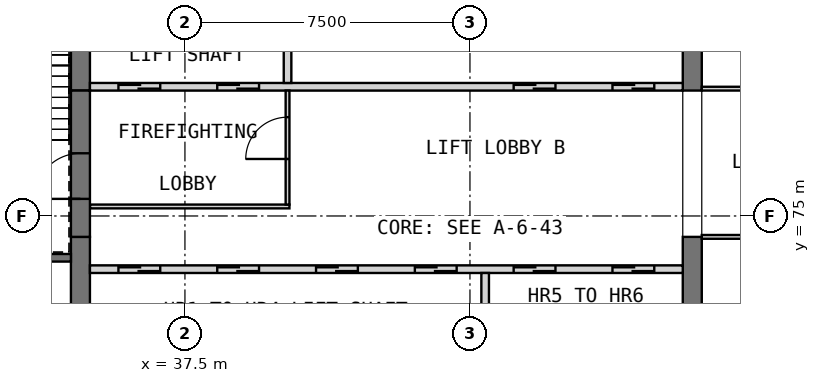
"""IFC4 building model, lengths in metres.
Left out: names, types, materials, properties, quantities, classifications, styles, units other than length and angle.
Written with IfcOpenShell. Run it as: python <this file> out.ifc"""

import sys

from ifc_helpers import new_model, si_unit, direction, frame, frame_2d, origin, place, context, subcontext, project, spatial, rectangle, extrude, element, fill, save


model = new_model("IFC4")
c1 = context("Model", 3, precision=1e-05, world=origin(), true_north=direction((0.0, 1.0)))
c2 = subcontext(c1, "Body", "Model", "MODEL_VIEW")
j1 = project(units=[si_unit("LENGTHUNIT", "METRE"), si_unit("PLANEANGLEUNIT", "RADIAN")], contexts=[c1])
p1 = place(None, origin())
s1 = spatial("IfcSite", under=j1, at=p1, CompositionType="ELEMENT")
p2 = place(p1, origin())
s2 = spatial("IfcBuilding", under=s1, at=p2, CompositionType="ELEMENT")
p3 = place(p2, frame((0.0, 0.0, 292.2)))
s3 = spatial("IfcBuildingStorey", under=s2, at=p3, CompositionType="ELEMENT", Elevation=292.2)
p4 = place(p3, frame((34.75, 68.05, 0.0), z_axis=(0.0, 0.0, 1.0), x_axis=(0.0, 1.0, 0.0)))
e1 = element("IfcWall", 1, at=p4, inside=s3, PredefinedType="SHEAR", context=c2, shape_type="SweptSolid", body=[
    extrude(rectangle(XDim=6.4, YDim=0.5, at=frame_2d((3.2, 0.0))), origin(), (0.0, 0.0, 1.0), 5.5),
])
p5 = place(p3, frame((34.75, 78.3, 0.0), z_axis=(0.0, 0.0, 1.0), x_axis=(0.0, 1.0, 0.0)))
e2 = element("IfcWall", 2, at=p5, inside=s3, PredefinedType="SHEAR", context=c2, shape_type="SweptSolid", body=[
    extrude(rectangle(XDim=3.6, YDim=0.5, at=frame_2d((1.8, 0.0))), origin(), (0.0, 0.0, 1.0), 5.5),
])
p6 = place(p3, frame((50.85, 68.05, 0.0), z_axis=(0.0, 0.0, 1.0), x_axis=(0.0, 1.0, 0.0)))
e3 = element("IfcWall", 3, at=p6, inside=s3, PredefinedType="SHEAR", context=c2, shape_type="SweptSolid", body=[
    extrude(rectangle(XDim=6.4, YDim=0.5, at=frame_2d((3.2, 0.0))), origin(), (0.0, 0.0, 1.0), 5.5),
])
p7 = place(p3, frame((50.85, 78.3, 0.0), z_axis=(0.0, 0.0, 1.0), x_axis=(0.0, 1.0, 0.0)))
e4 = element("IfcWall", 4, at=p7, inside=s3, PredefinedType="SHEAR", context=c2, shape_type="SweptSolid", body=[
    extrude(rectangle(XDim=3.6, YDim=0.5, at=frame_2d((1.8, 0.0))), origin(), (0.0, 0.0, 1.0), 5.5),
])
p8 = place(p3, frame((35.0, 73.6, 0.0), z_axis=(0.0, 0.0, 1.0), x_axis=(1.0, 0.0, 0.0)))
e5 = element("IfcWall", 5, at=p8, inside=s3, PredefinedType="SOLIDWALL", context=c2, shape_type="SweptSolid", body=[
    extrude(rectangle(XDim=15.6, YDim=0.2, at=frame_2d((7.8, 0.0))), origin(), (0.0, 0.0, 1.0), 5.5),
])
p9 = place(p8, frame((0.75, 0.0, 0.0)))
e6 = element("IfcOpeningElement", 6, at=p9, cuts=e5, PredefinedType="OPENING", context=c2, shape_type="SweptSolid", body=[
    extrude(rectangle(XDim=1.1, YDim=2.1, at=frame_2d((0.55, 1.05))), frame((0.0, 0.11, 0.0), z_axis=(0.0, -1.0, 0.0), x_axis=(1.0, 0.0, 0.0)), (0.0, 0.0, 1.0), 0.22),
])
p10 = place(p8, frame((3.35, 0.0, 0.0)))
e7 = element("IfcOpeningElement", 7, at=p10, cuts=e5, PredefinedType="OPENING", context=c2, shape_type="SweptSolid", body=[
    extrude(rectangle(XDim=1.1, YDim=2.1, at=frame_2d((0.55, 1.05))), frame((0.0, 0.11, 0.0), z_axis=(0.0, -1.0, 0.0), x_axis=(1.0, 0.0, 0.0)), (0.0, 0.0, 1.0), 0.22),
])
p11 = place(p8, frame((5.95, 0.0, 0.0)))
e8 = element("IfcOpeningElement", 8, at=p11, cuts=e5, PredefinedType="OPENING", context=c2, shape_type="SweptSolid", body=[
    extrude(rectangle(XDim=1.1, YDim=2.1, at=frame_2d((0.55, 1.05))), frame((0.0, 0.11, 0.0), z_axis=(0.0, -1.0, 0.0), x_axis=(1.0, 0.0, 0.0)), (0.0, 0.0, 1.0), 0.22),
])
p12 = place(p8, frame((8.55, 0.0, 0.0)))
e9 = element("IfcOpeningElement", 9, at=p12, cuts=e5, PredefinedType="OPENING", context=c2, shape_type="SweptSolid", body=[
    extrude(rectangle(XDim=1.1, YDim=2.1, at=frame_2d((0.55, 1.05))), frame((0.0, 0.11, 0.0), z_axis=(0.0, -1.0, 0.0), x_axis=(1.0, 0.0, 0.0)), (0.0, 0.0, 1.0), 0.22),
])
p13 = place(p8, frame((11.15, 0.0, 0.0)))
e10 = element("IfcOpeningElement", 10, at=p13, cuts=e5, PredefinedType="OPENING", context=c2, shape_type="SweptSolid", body=[
    extrude(rectangle(XDim=1.1, YDim=2.1, at=frame_2d((0.55, 1.05))), frame((0.0, 0.11, 0.0), z_axis=(0.0, -1.0, 0.0), x_axis=(1.0, 0.0, 0.0)), (0.0, 0.0, 1.0), 0.22),
])
p14 = place(p8, frame((13.75, 0.0, 0.0)))
e11 = element("IfcOpeningElement", 11, at=p14, cuts=e5, PredefinedType="OPENING", context=c2, shape_type="SweptSolid", body=[
    extrude(rectangle(XDim=1.1, YDim=2.1, at=frame_2d((0.55, 1.05))), frame((0.0, 0.11, 0.0), z_axis=(0.0, -1.0, 0.0), x_axis=(1.0, 0.0, 0.0)), (0.0, 0.0, 1.0), 0.22),
])
p15 = place(p3, frame((45.4, 71.5, 0.0), z_axis=(0.0, 0.0, 1.0), x_axis=(0.0, 1.0, 0.0)))
e12 = element("IfcWall", 12, at=p15, inside=s3, PredefinedType="SOLIDWALL", context=c2, shape_type="SweptSolid", body=[
    extrude(rectangle(XDim=2.0, YDim=0.2, at=frame_2d((1.0, 0.0))), origin(), (0.0, 0.0, 1.0), 5.5),
])
p16 = place(p3, frame((35.0, 78.4, 0.0), z_axis=(0.0, 0.0, 1.0), x_axis=(1.0, 0.0, 0.0)))
e13 = element("IfcWall", 13, at=p16, inside=s3, PredefinedType="SOLIDWALL", context=c2, shape_type="SweptSolid", body=[
    extrude(rectangle(XDim=15.6, YDim=0.2, at=frame_2d((7.8, 0.0))), origin(), (0.0, 0.0, 1.0), 5.5),
])
p17 = place(p16, frame((0.75, 0.0, 0.0)))
e14 = element("IfcOpeningElement", 14, at=p17, cuts=e13, PredefinedType="OPENING", context=c2, shape_type="SweptSolid", body=[
    extrude(rectangle(XDim=1.1, YDim=2.1, at=frame_2d((0.55, 1.05))), frame((0.0, 0.11, 0.0), z_axis=(0.0, -1.0, 0.0), x_axis=(1.0, 0.0, 0.0)), (0.0, 0.0, 1.0), 0.22),
])
p18 = place(p16, frame((3.35, 0.0, 0.0)))
e15 = element("IfcOpeningElement", 15, at=p18, cuts=e13, PredefinedType="OPENING", context=c2, shape_type="SweptSolid", body=[
    extrude(rectangle(XDim=1.1, YDim=2.1, at=frame_2d((0.55, 1.05))), frame((0.0, 0.11, 0.0), z_axis=(0.0, -1.0, 0.0), x_axis=(1.0, 0.0, 0.0)), (0.0, 0.0, 1.0), 0.22),
])
p19 = place(p16, frame((11.15, 0.0, 0.0)))
e16 = element("IfcOpeningElement", 16, at=p19, cuts=e13, PredefinedType="OPENING", context=c2, shape_type="SweptSolid", body=[
    extrude(rectangle(XDim=1.1, YDim=2.1, at=frame_2d((0.55, 1.05))), frame((0.0, 0.11, 0.0), z_axis=(0.0, -1.0, 0.0), x_axis=(1.0, 0.0, 0.0)), (0.0, 0.0, 1.0), 0.22),
])
p20 = place(p16, frame((13.75, 0.0, 0.0)))
e17 = element("IfcOpeningElement", 17, at=p20, cuts=e13, PredefinedType="OPENING", context=c2, shape_type="SweptSolid", body=[
    extrude(rectangle(XDim=1.1, YDim=2.1, at=frame_2d((0.55, 1.05))), frame((0.0, 0.11, 0.0), z_axis=(0.0, -1.0, 0.0), x_axis=(1.0, 0.0, 0.0)), (0.0, 0.0, 1.0), 0.22),
])
p21 = place(p3, frame((40.2, 78.5, 0.0), z_axis=(0.0, 0.0, 1.0), x_axis=(0.0, 1.0, 0.0)))
e18 = element("IfcWall", 18, at=p21, inside=s3, PredefinedType="SOLIDWALL", context=c2, shape_type="SweptSolid", body=[
    extrude(rectangle(XDim=3.4, YDim=0.2, at=frame_2d((1.7, 0.0))), origin(), (0.0, 0.0, 1.0), 5.5),
])
p22 = place(p3, frame((35.0, 75.25, 0.0), z_axis=(0.0, 0.0, 1.0), x_axis=(1.0, 0.0, 0.0)))
e19 = element("IfcWall", 19, at=p22, inside=s3, PredefinedType="PARTITIONING", context=c2, shape_type="SweptSolid", body=[
    extrude(rectangle(XDim=5.25, YDim=0.1, at=frame_2d((2.625, 0.0))), origin(), (0.0, 0.0, 1.0), 5.2),
])
p23 = place(p3, frame((40.2, 75.3, 0.0), z_axis=(0.0, 0.0, 1.0), x_axis=(0.0, 1.0, 0.0)))
e20 = element("IfcWall", 20, at=p23, inside=s3, PredefinedType="PARTITIONING", context=c2, shape_type="SweptSolid", body=[
    extrude(rectangle(XDim=3.0, YDim=0.1, at=frame_2d((1.5, 0.0))), origin(), (0.0, 0.0, 1.0), 5.2),
])
p24 = place(p23, frame((1.2, 0.0, 0.0)))
e21 = element("IfcOpeningElement", 21, at=p24, cuts=e20, PredefinedType="OPENING", context=c2, shape_type="SweptSolid", body=[
    extrude(rectangle(XDim=1.1, YDim=2.1, at=frame_2d((0.55, 1.05))), frame((0.0, 0.06, 0.0), z_axis=(0.0, -1.0, 0.0), x_axis=(1.0, 0.0, 0.0)), (0.0, 0.0, 1.0), 0.12),
])
p25 = place(p3, frame((34.75, 74.45, 0.0), z_axis=(0.0, 0.0, 1.0), x_axis=(0.0, 1.0, 0.0)))
e22 = element("IfcWall", 22, at=p25, inside=s3, PredefinedType="SOLIDWALL", context=c2, shape_type="SweptSolid", body=[
    extrude(rectangle(XDim=3.85, YDim=0.5, at=frame_2d((1.925, 0.0))), origin(), (0.0, 0.0, 1.0), 4.3),
])
p26 = place(p25, frame((1.0, 0.0, 0.0)))
e23 = element("IfcOpeningElement", 23, at=p26, cuts=e22, PredefinedType="OPENING", context=c2, shape_type="SweptSolid", body=[
    extrude(rectangle(XDim=1.2, YDim=2.1, at=frame_2d((0.6, 1.05))), frame((0.0, 0.26, 0.0), z_axis=(0.0, -1.0, 0.0), x_axis=(1.0, 0.0, 0.0)), (0.0, 0.0, 1.0), 0.52),
])
p27 = place(p3, frame((30.6, 73.9, 0.0), z_axis=(0.0, 0.0, 1.0), x_axis=(1.0, 0.0, 0.0)))
e24 = element("IfcWall", 24, at=p27, inside=s3, PredefinedType="SOLIDWALL", context=c2, shape_type="SweptSolid", body=[
    extrude(rectangle(XDim=3.9, YDim=0.2, at=frame_2d((1.95, 0.0))), origin(), (0.0, 0.0, 1.0), 5.2),
])
p28 = place(p27, frame((1.7, 0.0, 0.0)))
e25 = element("IfcOpeningElement", 25, at=p28, cuts=e24, PredefinedType="OPENING", context=c2, shape_type="SweptSolid", body=[
    extrude(rectangle(XDim=0.9, YDim=2.1, at=frame_2d((0.45, 1.05))), frame((0.0, 0.11, 0.0), z_axis=(0.0, -1.0, 0.0), x_axis=(1.0, 0.0, 0.0)), (0.0, 0.0, 1.0), 0.22),
])
p29 = place(p3, frame((51.1, 74.45, 0.0), z_axis=(0.0, 0.0, 1.0), x_axis=(1.0, 0.0, 0.0)))
e26 = element("IfcWall", 26, at=p29, inside=s3, PredefinedType="PARTITIONING", context=c2, shape_type="SweptSolid", body=[
    extrude(rectangle(XDim=8.3, YDim=0.1, at=frame_2d((4.15, 0.0))), origin(), (0.0, 0.0, 1.0), 5.2),
])
p30 = place(p29, frame((3.7, 0.0, 0.0)))
e27 = element("IfcOpeningElement", 27, at=p30, cuts=e26, PredefinedType="OPENING", context=c2, shape_type="SweptSolid", body=[
    extrude(rectangle(XDim=0.9, YDim=2.1, at=frame_2d((0.45, 1.05))), frame((0.0, 0.06, 0.0), z_axis=(0.0, -1.0, 0.0), x_axis=(1.0, 0.0, 0.0)), (0.0, 0.0, 1.0), 0.12),
])
p31 = place(p3, frame((51.1, 78.35, 0.0), z_axis=(0.0, 0.0, 1.0), x_axis=(1.0, 0.0, 0.0)))
e28 = element("IfcWall", 28, at=p31, inside=s3, PredefinedType="PARTITIONING", context=c2, shape_type="SweptSolid", body=[
    extrude(rectangle(XDim=8.3, YDim=0.1, at=frame_2d((4.15, 0.0))), origin(), (0.0, 0.0, 1.0), 5.2),
])
p32 = place(p31, frame((3.7, 0.0, 0.0)))
e29 = element("IfcOpeningElement", 29, at=p32, cuts=e28, PredefinedType="OPENING", context=c2, shape_type="SweptSolid", body=[
    extrude(rectangle(XDim=0.9, YDim=2.1, at=frame_2d((0.45, 1.05))), frame((0.0, 0.06, 0.0), z_axis=(0.0, -1.0, 0.0), x_axis=(1.0, 0.0, 0.0)), (0.0, 0.0, 1.0), 0.12),
])
p33 = place(p9, origin())
e30 = element("IfcDoor", 30, at=p33, inside=s3, OperationType="DOUBLE_DOOR_SLIDING", PredefinedType="DOOR", context=c2, shape_type="SweptSolid", body=[
    extrude(rectangle(XDim=1.1, YDim=2.1, at=frame_2d((0.55, 1.05))), frame((0.0, 0.025, 0.0), z_axis=(0.0, -1.0, 0.0), x_axis=(1.0, 0.0, 0.0)), (0.0, 0.0, 1.0), 0.05),
])
fill(e6, e30)
p34 = place(p10, origin())
e31 = element("IfcDoor", 31, at=p34, inside=s3, OperationType="DOUBLE_DOOR_SLIDING", PredefinedType="DOOR", context=c2, shape_type="SweptSolid", body=[
    extrude(rectangle(XDim=1.1, YDim=2.1, at=frame_2d((0.55, 1.05))), frame((0.0, 0.025, 0.0), z_axis=(0.0, -1.0, 0.0), x_axis=(1.0, 0.0, 0.0)), (0.0, 0.0, 1.0), 0.05),
])
fill(e7, e31)
p35 = place(p11, origin())
e32 = element("IfcDoor", 32, at=p35, inside=s3, OperationType="DOUBLE_DOOR_SLIDING", PredefinedType="DOOR", context=c2, shape_type="SweptSolid", body=[
    extrude(rectangle(XDim=1.1, YDim=2.1, at=frame_2d((0.55, 1.05))), frame((0.0, 0.025, 0.0), z_axis=(0.0, -1.0, 0.0), x_axis=(1.0, 0.0, 0.0)), (0.0, 0.0, 1.0), 0.05),
])
fill(e8, e32)
p36 = place(p12, origin())
e33 = element("IfcDoor", 33, at=p36, inside=s3, OperationType="DOUBLE_DOOR_SLIDING", PredefinedType="DOOR", context=c2, shape_type="SweptSolid", body=[
    extrude(rectangle(XDim=1.1, YDim=2.1, at=frame_2d((0.55, 1.05))), frame((0.0, 0.025, 0.0), z_axis=(0.0, -1.0, 0.0), x_axis=(1.0, 0.0, 0.0)), (0.0, 0.0, 1.0), 0.05),
])
fill(e9, e33)
p37 = place(p13, origin())
e34 = element("IfcDoor", 34, at=p37, inside=s3, OperationType="DOUBLE_DOOR_SLIDING", PredefinedType="DOOR", context=c2, shape_type="SweptSolid", body=[
    extrude(rectangle(XDim=1.1, YDim=2.1, at=frame_2d((0.55, 1.05))), frame((0.0, 0.025, 0.0), z_axis=(0.0, -1.0, 0.0), x_axis=(1.0, 0.0, 0.0)), (0.0, 0.0, 1.0), 0.05),
])
fill(e10, e34)
p38 = place(p14, origin())
e35 = element("IfcDoor", 35, at=p38, inside=s3, OperationType="DOUBLE_DOOR_SLIDING", PredefinedType="DOOR", context=c2, shape_type="SweptSolid", body=[
    extrude(rectangle(XDim=1.1, YDim=2.1, at=frame_2d((0.55, 1.05))), frame((0.0, 0.025, 0.0), z_axis=(0.0, -1.0, 0.0), x_axis=(1.0, 0.0, 0.0)), (0.0, 0.0, 1.0), 0.05),
])
fill(e11, e35)
p39 = place(p17, origin())
e36 = element("IfcDoor", 36, at=p39, inside=s3, OperationType="DOUBLE_DOOR_SLIDING", PredefinedType="DOOR", context=c2, shape_type="SweptSolid", body=[
    extrude(rectangle(XDim=1.1, YDim=2.1, at=frame_2d((0.55, 1.05))), frame((0.0, 0.025, 0.0), z_axis=(0.0, -1.0, 0.0), x_axis=(1.0, 0.0, 0.0)), (0.0, 0.0, 1.0), 0.05),
])
fill(e14, e36)
p40 = place(p18, origin())
e37 = element("IfcDoor", 37, at=p40, inside=s3, OperationType="DOUBLE_DOOR_SLIDING", PredefinedType="DOOR", context=c2, shape_type="SweptSolid", body=[
    extrude(rectangle(XDim=1.1, YDim=2.1, at=frame_2d((0.55, 1.05))), frame((0.0, 0.025, 0.0), z_axis=(0.0, -1.0, 0.0), x_axis=(1.0, 0.0, 0.0)), (0.0, 0.0, 1.0), 0.05),
])
fill(e15, e37)
p41 = place(p19, origin())
e38 = element("IfcDoor", 38, at=p41, inside=s3, OperationType="DOUBLE_DOOR_SLIDING", PredefinedType="DOOR", context=c2, shape_type="SweptSolid", body=[
    extrude(rectangle(XDim=1.1, YDim=2.1, at=frame_2d((0.55, 1.05))), frame((0.0, 0.025, 0.0), z_axis=(0.0, -1.0, 0.0), x_axis=(1.0, 0.0, 0.0)), (0.0, 0.0, 1.0), 0.05),
])
fill(e16, e38)
p42 = place(p20, origin())
e39 = element("IfcDoor", 39, at=p42, inside=s3, OperationType="DOUBLE_DOOR_SLIDING", PredefinedType="DOOR", context=c2, shape_type="SweptSolid", body=[
    extrude(rectangle(XDim=1.1, YDim=2.1, at=frame_2d((0.55, 1.05))), frame((0.0, 0.025, 0.0), z_axis=(0.0, -1.0, 0.0), x_axis=(1.0, 0.0, 0.0)), (0.0, 0.0, 1.0), 0.05),
])
fill(e17, e39)
p43 = place(p24, origin())
e40 = element("IfcDoor", 40, at=p43, inside=s3, OperationType="SINGLE_SWING_LEFT", PredefinedType="DOOR", context=c2, shape_type="SweptSolid", body=[
    extrude(rectangle(XDim=1.1, YDim=2.1, at=frame_2d((0.55, 1.05))), frame((0.0, 0.025, 0.0), z_axis=(0.0, -1.0, 0.0), x_axis=(1.0, 0.0, 0.0)), (0.0, 0.0, 1.0), 0.05),
])
fill(e21, e40)
p44 = place(p26, origin())
e41 = element("IfcDoor", 41, at=p44, inside=s3, OperationType="SINGLE_SWING_RIGHT", PredefinedType="DOOR", context=c2, shape_type="SweptSolid", body=[
    extrude(rectangle(XDim=1.2, YDim=2.1, at=frame_2d((0.6, 1.05))), frame((0.0, 0.025, 0.0), z_axis=(0.0, -1.0, 0.0), x_axis=(1.0, 0.0, 0.0)), (0.0, 0.0, 1.0), 0.05),
])
fill(e23, e41)
save(model, sys.argv[1])
